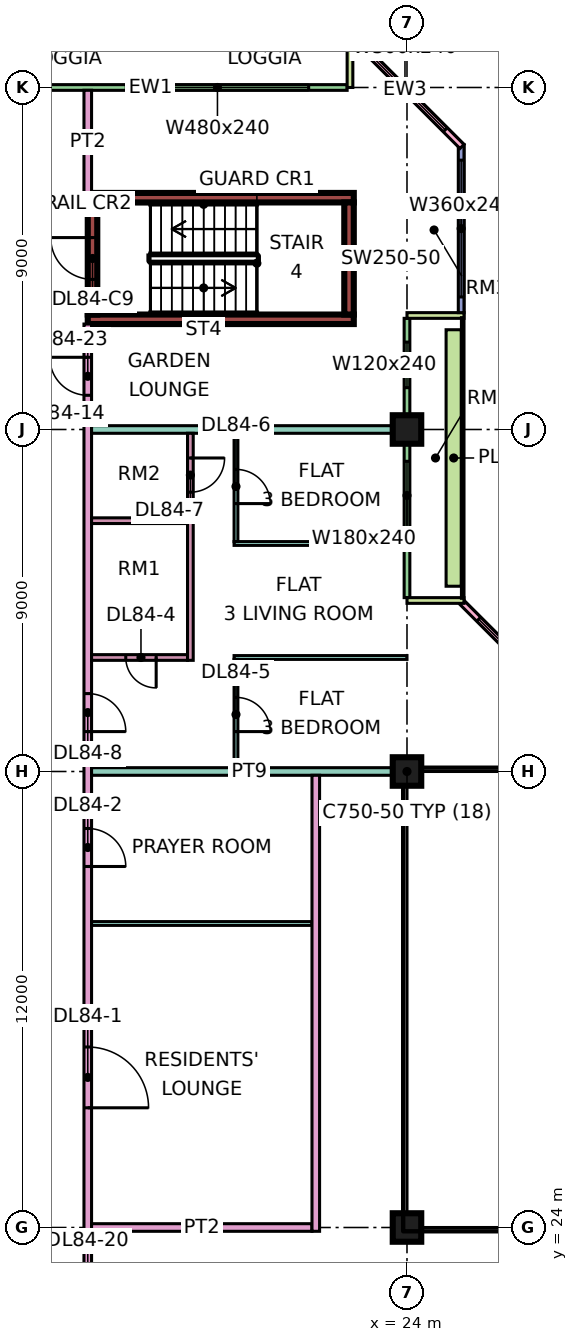
"""IFC4 building model, lengths in metres.
Left out: names, types, materials, properties, quantities, classifications, styles, units other than length and angle.
Written with IfcOpenShell. Run it as: python <this file> out.ifc"""

import sys

from ifc_helpers import new_model, si_unit, direction, frame, frame_2d, origin, origin_2d, place, context, subcontext, project, spatial, rectangle, extrude, element, fill, save


model = new_model("IFC4")
c1 = context("Model", 3, precision=1e-05, world=origin(), true_north=direction((0.0, 1.0)))
c2 = subcontext(c1, "Body", "Model", "MODEL_VIEW")
j1 = project(units=[si_unit("LENGTHUNIT", "METRE"), si_unit("PLANEANGLEUNIT", "RADIAN")], contexts=[c1])
p1 = place(None, origin())
s1 = spatial("IfcSite", under=j1, at=p1, CompositionType="ELEMENT")
p2 = place(p1, origin())
s2 = spatial("IfcBuilding", under=s1, at=p2, CompositionType="ELEMENT")
p3 = place(p2, frame((0.0, 0.0, 361.4)))
s3 = spatial("IfcBuildingStorey", under=s2, at=p3, CompositionType="ELEMENT", Elevation=361.4)
for number, where, z_axis, x_axis in (
    (1, (24.0, 24.0, 0.0), (0.0, 0.0, 1.0), (1.0, 0.0, 0.0)),
    (2, (24.0, 36.0, 0.0), (0.0, 0.0, 1.0), (1.0, 0.0, 0.0)),
    (3, (24.0, 45.0, 0.0), (0.0, 0.0, 1.0), (1.0, 0.0, 0.0)),
):
    element("IfcColumn", number, at=place(p3, frame(where, z_axis=z_axis, x_axis=x_axis)), inside=s3, PredefinedType="COLUMN", context=c2, shape_type="SweptSolid", body=[
        extrude(rectangle(XDim=0.75, YDim=0.75, at=origin_2d()), origin(), (0.0, 0.0, 1.0), 3.75),
    ])
for number, where, z_axis, x_axis in (
    (4, (15.6, 47.9, 0.0), (0.0, 0.0, 1.0), (1.0, 0.0, 0.0)),
    (5, (15.6, 51.1, 0.0), (0.0, 0.0, 1.0), (1.0, 0.0, 0.0)),
):
    element("IfcWall", number, at=place(p3, frame(where, z_axis=z_axis, x_axis=x_axis)), inside=s3, PredefinedType="SHEAR", context=c2, shape_type="SweptSolid", body=[
        extrude(rectangle(XDim=7.0, YDim=0.25, at=frame_2d((3.5, 0.0))), origin(), (0.0, 0.0, 1.0), 3.75),
    ])
p4 = place(p3, frame((15.725, 48.025, 0.0), z_axis=(0.0, 0.0, 1.0), x_axis=(0.0, 1.0, 0.0)))
e6 = element("IfcWall", 6, at=p4, inside=s3, PredefinedType="SHEAR", context=c2, shape_type="SweptSolid", body=[
    extrude(rectangle(XDim=2.95, YDim=0.25, at=frame_2d((1.475, 0.0))), origin(), (0.0, 0.0, 1.0), 3.75),
])
p5 = place(p4, frame((0.925, 0.0, 0.0)))
e7 = element("IfcOpeningElement", 7, at=p5, cuts=e6, PredefinedType="OPENING", context=c2, shape_type="SweptSolid", body=[
    extrude(rectangle(XDim=1.1, YDim=2.2, at=frame_2d((0.55, 1.1))), frame((0.0, 0.135, 0.0), z_axis=(0.0, -1.0, 0.0), x_axis=(1.0, 0.0, 0.0)), (0.0, 0.0, 1.0), 0.27),
])
p6 = place(p3, frame((22.475, 48.025, 0.0), z_axis=(0.0, 0.0, 1.0), x_axis=(0.0, 1.0, 0.0)))
e8 = element("IfcWall", 8, at=p6, inside=s3, PredefinedType="SHEAR", context=c2, shape_type="SweptSolid", body=[
    extrude(rectangle(XDim=2.95, YDim=0.25, at=frame_2d((1.475, 0.0))), origin(), (0.0, 0.0, 1.0), 3.75),
])
p7 = place(p3, frame((28.447, 37.447, 0.0), z_axis=(0.0, 0.0, 1.0), x_axis=(-0.707106781187, 0.707106781187, 0.0)))
e9 = element("IfcWall", 9, at=p7, inside=s3, PredefinedType="SOLIDWALL", context=c2, shape_type="SweptSolid", body=[
    extrude(rectangle(XDim=4.243, YDim=0.15, at=frame_2d((2.121, 0.0))), origin(), (0.0, 0.0, 1.0), 3.35),
])
p8 = place(p7, frame((0.621, 0.0, 0.45)))
e10 = element("IfcOpeningElement", 10, at=p8, cuts=e9, PredefinedType="OPENING", context=c2, shape_type="SweptSolid", body=[
    extrude(rectangle(XDim=3.0, YDim=2.4, at=frame_2d((1.5, 1.2))), frame((0.0, 0.085, 0.0), z_axis=(0.0, -1.0, 0.0), x_axis=(1.0, 0.0, 0.0)), (0.0, 0.0, 1.0), 0.17),
])
p9 = place(p3, frame((24.0, 40.575, 0.0), z_axis=(0.0, 0.0, 1.0), x_axis=(0.0, 1.0, 0.0)))
e11 = element("IfcWall", 11, at=p9, inside=s3, PredefinedType="SOLIDWALL", context=c2, shape_type="SweptSolid", body=[
    extrude(rectangle(XDim=7.35, YDim=0.15, at=frame_2d((3.675, 0.0))), origin(), (0.0, 0.0, 1.0), 3.35),
])
p10 = place(p9, frame((1.788, 0.0, 0.45)))
e12 = element("IfcOpeningElement", 12, at=p10, cuts=e11, PredefinedType="OPENING", context=c2, shape_type="SweptSolid", body=[
    extrude(rectangle(XDim=1.8, YDim=2.4, at=frame_2d((0.9, 1.2))), frame((0.0, 0.085, 0.0), z_axis=(0.0, -1.0, 0.0), x_axis=(1.0, 0.0, 0.0)), (0.0, 0.0, 1.0), 0.17),
])
p11 = place(p9, frame((5.525, 0.0, 0.45)))
e13 = element("IfcOpeningElement", 13, at=p11, cuts=e11, PredefinedType="OPENING", context=c2, shape_type="SweptSolid", body=[
    extrude(rectangle(XDim=1.2, YDim=2.4, at=frame_2d((0.6, 1.2))), frame((0.0, 0.085, 0.0), z_axis=(0.0, -1.0, 0.0), x_axis=(1.0, 0.0, 0.0)), (0.0, 0.0, 1.0), 0.17),
])
for number, where, z_axis, x_axis in (
    (14, (25.5, 40.5, 0.0), (0.0, 0.0, 1.0), (-1.0, 0.0, 0.0)),
    (15, (25.5, 48.0, 0.0), (0.0, 0.0, 1.0), (-1.0, 0.0, 0.0)),
):
    element("IfcWall", number, at=place(p3, frame(where, z_axis=z_axis, x_axis=x_axis)), inside=s3, PredefinedType="SOLIDWALL", context=c2, shape_type="SweptSolid", body=[
        extrude(rectangle(XDim=1.5, YDim=0.15, at=frame_2d((0.75, 0.0))), origin(), (0.0, 0.0, 1.0), 3.35),
    ])
p12 = place(p3, frame((25.425, 48.075, 0.0), z_axis=(0.0, 0.0, 1.0), x_axis=(0.0, 1.0, 0.0)))
e16 = element("IfcWall", 16, at=p12, inside=s3, PredefinedType="SOLIDWALL", context=c2, shape_type="SweptSolid", body=[
    extrude(rectangle(XDim=4.425, YDim=0.15, at=frame_2d((2.212, 0.0))), origin(), (0.0, 0.0, 1.0), 3.35),
])
p13 = place(p12, frame((0.413, 0.0, 0.45)))
e17 = element("IfcOpeningElement", 17, at=p13, cuts=e16, PredefinedType="OPENING", context=c2, shape_type="SweptSolid", body=[
    extrude(rectangle(XDim=3.6, YDim=2.4, at=frame_2d((1.8, 1.2))), frame((0.0, 0.085, 0.0), z_axis=(0.0, -1.0, 0.0), x_axis=(1.0, 0.0, 0.0)), (0.0, 0.0, 1.0), 0.17),
])
p14 = place(p3, frame((25.447, 52.447, 0.0), z_axis=(0.0, 0.0, 1.0), x_axis=(-0.707106781187, 0.707106781187, 0.0)))
e18 = element("IfcWall", 18, at=p14, inside=s3, PredefinedType="SOLIDWALL", context=c2, shape_type="SweptSolid", body=[
    extrude(rectangle(XDim=4.243, YDim=0.15, at=frame_2d((2.121, 0.0))), origin(), (0.0, 0.0, 1.0), 3.35),
])
p15 = place(p14, frame((0.621, 0.0, 0.45)))
e19 = element("IfcOpeningElement", 19, at=p15, cuts=e18, PredefinedType="OPENING", context=c2, shape_type="SweptSolid", body=[
    extrude(rectangle(XDim=3.0, YDim=2.4, at=frame_2d((1.5, 1.2))), frame((0.0, 0.085, 0.0), z_axis=(0.0, -1.0, 0.0), x_axis=(1.0, 0.0, 0.0)), (0.0, 0.0, 1.0), 0.17),
])
p16 = place(p3, frame((22.425, 54.0, 0.0), z_axis=(0.0, 0.0, 1.0), x_axis=(-1.0, 0.0, 0.0)))
e20 = element("IfcWall", 20, at=p16, inside=s3, PredefinedType="SOLIDWALL", context=c2, shape_type="SweptSolid", body=[
    extrude(rectangle(XDim=10.35, YDim=0.15, at=frame_2d((5.175, 0.0))), origin(), (0.0, 0.0, 1.0), 3.35),
])
p17 = place(p16, frame((1.012, 0.0, 0.45)))
e21 = element("IfcOpeningElement", 21, at=p17, cuts=e20, PredefinedType="OPENING", context=c2, shape_type="SweptSolid", body=[
    extrude(rectangle(XDim=4.8, YDim=2.4, at=frame_2d((2.4, 1.2))), frame((0.0, 0.085, 0.0), z_axis=(0.0, -1.0, 0.0), x_axis=(1.0, 0.0, 0.0)), (0.0, 0.0, 1.0), 0.17),
])
p18 = place(p3, frame((22.5, 55.5, 0.0), z_axis=(0.0, 0.0, 1.0), x_axis=(0.0, -1.0, 0.0)))
e22 = element("IfcWall", 22, at=p18, inside=s3, PredefinedType="SOLIDWALL", context=c2, shape_type="SweptSolid", body=[
    extrude(rectangle(XDim=1.5, YDim=0.15, at=frame_2d((0.75, 0.0))), origin(), (0.0, 0.0, 1.0), 3.35),
])
p19 = place(p3, frame((25.229, 40.875, 0.0), z_axis=(0.0, 0.0, 1.0), x_axis=(0.0, 1.0, 0.0)))
e23 = element("IfcWall", 23, at=p19, inside=s3, PredefinedType="SOLIDWALL", context=c2, shape_type="SweptSolid", body=[
    extrude(rectangle(XDim=6.75, YDim=0.4, at=frame_2d((3.375, 0.0))), origin(), (0.0, 0.0, 1.0), 0.7),
])
p20 = place(p3, frame((15.6, 20.0, 0.0), z_axis=(0.0, 0.0, 1.0), x_axis=(0.0, 1.0, 0.0)))
e24 = element("IfcWall", 24, at=p20, inside=s3, PredefinedType="PARTITIONING", context=c2, shape_type="SweptSolid", body=[
    extrude(rectangle(XDim=27.775, YDim=0.2, at=frame_2d((13.887, 0.0))), origin(), (0.0, 0.0, 1.0), 3.35),
])
p21 = place(p20, frame((7.15, 0.0, 0.0)))
e25 = element("IfcOpeningElement", 25, at=p21, cuts=e24, PredefinedType="OPENING", context=c2, shape_type="SweptSolid", body=[
    extrude(rectangle(XDim=1.6, YDim=2.1, at=frame_2d((0.8, 1.05))), frame((0.0, 0.11, 0.0), z_axis=(0.0, -1.0, 0.0), x_axis=(1.0, 0.0, 0.0)), (0.0, 0.0, 1.0), 0.22),
])
p22 = place(p20, frame((13.5, 0.0, 0.0)))
e26 = element("IfcOpeningElement", 26, at=p22, cuts=e24, PredefinedType="OPENING", context=c2, shape_type="SweptSolid", body=[
    extrude(rectangle(XDim=1.0, YDim=2.1, at=frame_2d((0.5, 1.05))), frame((0.0, 0.11, 0.0), z_axis=(0.0, -1.0, 0.0), x_axis=(1.0, 0.0, 0.0)), (0.0, 0.0, 1.0), 0.22),
])
p23 = place(p20, frame((17.05, 0.0, 0.0)))
e27 = element("IfcOpeningElement", 27, at=p23, cuts=e24, PredefinedType="OPENING", context=c2, shape_type="SweptSolid", body=[
    extrude(rectangle(XDim=1.0, YDim=2.1, at=frame_2d((0.5, 1.05))), frame((0.0, 0.11, 0.0), z_axis=(0.0, -1.0, 0.0), x_axis=(1.0, 0.0, 0.0)), (0.0, 0.0, 1.0), 0.22),
])
p24 = place(p20, frame((1.15, 0.0, 0.0)))
e28 = element("IfcOpeningElement", 28, at=p24, cuts=e24, PredefinedType="OPENING", context=c2, shape_type="SweptSolid", body=[
    extrude(rectangle(XDim=1.8, YDim=2.1, at=frame_2d((0.9, 1.05))), frame((0.0, 0.11, 0.0), z_axis=(0.0, -1.0, 0.0), x_axis=(1.0, 0.0, 0.0)), (0.0, 0.0, 1.0), 0.22),
])
p25 = place(p20, frame((25.9, 0.0, 0.0)))
e29 = element("IfcOpeningElement", 29, at=p25, cuts=e24, PredefinedType="OPENING", context=c2, shape_type="SweptSolid", body=[
    extrude(rectangle(XDim=1.0, YDim=2.1, at=frame_2d((0.5, 1.05))), frame((0.0, 0.11, 0.0), z_axis=(0.0, -1.0, 0.0), x_axis=(1.0, 0.0, 0.0)), (0.0, 0.0, 1.0), 0.22),
])
p26 = place(p3, frame((15.6, 51.225, 0.0), z_axis=(0.0, 0.0, 1.0), x_axis=(0.0, 1.0, 0.0)))
e30 = element("IfcWall", 30, at=p26, inside=s3, PredefinedType="PARTITIONING", context=c2, shape_type="SweptSolid", body=[
    extrude(rectangle(XDim=2.701, YDim=0.2, at=frame_2d((1.351, 0.0))), origin(), (0.0, 0.0, 1.0), 3.35),
])
p27 = place(p3, frame((15.7, 24.0, 0.0), z_axis=(0.0, 0.0, 1.0), x_axis=(1.0, 0.0, 0.0)))
e31 = element("IfcWall", 31, at=p27, inside=s3, PredefinedType="PARTITIONING", context=c2, shape_type="SweptSolid", body=[
    extrude(rectangle(XDim=5.8, YDim=0.2, at=frame_2d((2.9, 0.0))), origin(), (0.0, 0.0, 1.0), 3.35),
])
p28 = place(p3, frame((15.7, 32.0, 0.0), z_axis=(0.0, 0.0, 1.0), x_axis=(1.0, 0.0, 0.0)))
e32 = element("IfcWall", 32, at=p28, inside=s3, PredefinedType="PARTITIONING", context=c2, shape_type="SweptSolid", body=[
    extrude(rectangle(XDim=5.8, YDim=0.1, at=frame_2d((2.9, 0.0))), origin(), (0.0, 0.0, 1.0), 3.35),
])
p29 = place(p3, frame((15.7, 36.0, 0.0), z_axis=(0.0, 0.0, 1.0), x_axis=(1.0, 0.0, 0.0)))
e33 = element("IfcWall", 33, at=p29, inside=s3, PredefinedType="PARTITIONING", context=c2, shape_type="SweptSolid", body=[
    extrude(rectangle(XDim=8.3, YDim=0.2, at=frame_2d((4.15, 0.0))), origin(), (0.0, 0.0, 1.0), 3.35),
])
p30 = place(p3, frame((15.7, 39.0, 0.0), z_axis=(0.0, 0.0, 1.0), x_axis=(1.0, 0.0, 0.0)))
e34 = element("IfcWall", 34, at=p30, inside=s3, PredefinedType="PARTITIONING", context=c2, shape_type="SweptSolid", body=[
    extrude(rectangle(XDim=2.525, YDim=0.15, at=frame_2d((1.263, 0.0))), origin(), (0.0, 0.0, 1.0), 3.35),
])
p31 = place(p30, frame((0.9, 0.0, 0.0)))
e35 = element("IfcOpeningElement", 35, at=p31, cuts=e34, PredefinedType="OPENING", context=c2, shape_type="SweptSolid", body=[
    extrude(rectangle(XDim=0.8, YDim=2.1, at=frame_2d((0.4, 1.05))), frame((0.0, 0.085, 0.0), z_axis=(0.0, -1.0, 0.0), x_axis=(1.0, 0.0, 0.0)), (0.0, 0.0, 1.0), 0.17),
])
p32 = place(p3, frame((15.7, 42.6, 0.0), z_axis=(0.0, 0.0, 1.0), x_axis=(1.0, 0.0, 0.0)))
e36 = element("IfcWall", 36, at=p32, inside=s3, PredefinedType="PARTITIONING", context=c2, shape_type="SweptSolid", body=[
    extrude(rectangle(XDim=2.525, YDim=0.15, at=frame_2d((1.263, 0.0))), origin(), (0.0, 0.0, 1.0), 3.35),
])
p33 = place(p3, frame((15.7, 45.0, 0.0), z_axis=(0.0, 0.0, 1.0), x_axis=(1.0, 0.0, 0.0)))
e37 = element("IfcWall", 37, at=p33, inside=s3, PredefinedType="PARTITIONING", context=c2, shape_type="SweptSolid", body=[
    extrude(rectangle(XDim=8.226, YDim=0.2, at=frame_2d((4.113, 0.0))), origin(), (0.0, 0.0, 1.0), 3.35),
])
p34 = place(p3, frame((18.3, 38.925, 0.0), z_axis=(0.0, 0.0, 1.0), x_axis=(0.0, 1.0, 0.0)))
e38 = element("IfcWall", 38, at=p34, inside=s3, PredefinedType="PARTITIONING", context=c2, shape_type="SweptSolid", body=[
    extrude(rectangle(XDim=5.975, YDim=0.15, at=frame_2d((2.987, 0.0))), origin(), (0.0, 0.0, 1.0), 3.35),
])
p35 = place(p34, frame((4.425, 0.0, 0.0)))
e39 = element("IfcOpeningElement", 39, at=p35, cuts=e38, PredefinedType="OPENING", context=c2, shape_type="SweptSolid", body=[
    extrude(rectangle(XDim=0.9, YDim=2.1, at=frame_2d((0.45, 1.05))), frame((0.0, 0.085, 0.0), z_axis=(0.0, -1.0, 0.0), x_axis=(1.0, 0.0, 0.0)), (0.0, 0.0, 1.0), 0.17),
])
p36 = place(p3, frame((19.45, 39.0, 0.0), z_axis=(0.0, 0.0, 1.0), x_axis=(1.0, 0.0, 0.0)))
e40 = element("IfcWall", 40, at=p36, inside=s3, PredefinedType="PARTITIONING", context=c2, shape_type="SweptSolid", body=[
    extrude(rectangle(XDim=4.55, YDim=0.1, at=frame_2d((2.275, 0.0))), origin(), (0.0, 0.0, 1.0), 3.35),
])
p37 = place(p3, frame((19.45, 42.0, 0.0), z_axis=(0.0, 0.0, 1.0), x_axis=(1.0, 0.0, 0.0)))
e41 = element("IfcWall", 41, at=p37, inside=s3, PredefinedType="PARTITIONING", context=c2, shape_type="SweptSolid", body=[
    extrude(rectangle(XDim=4.476, YDim=0.1, at=frame_2d((2.238, 0.0))), origin(), (0.0, 0.0, 1.0), 3.35),
])
p38 = place(p3, frame((19.5, 36.1, 0.0), z_axis=(0.0, 0.0, 1.0), x_axis=(0.0, 1.0, 0.0)))
e42 = element("IfcWall", 42, at=p38, inside=s3, PredefinedType="PARTITIONING", context=c2, shape_type="SweptSolid", body=[
    extrude(rectangle(XDim=2.85, YDim=0.1, at=frame_2d((1.425, 0.0))), origin(), (0.0, 0.0, 1.0), 3.35),
])
p39 = place(p38, frame((0.95, 0.0, 0.0)))
e43 = element("IfcOpeningElement", 43, at=p39, cuts=e42, PredefinedType="OPENING", context=c2, shape_type="SweptSolid", body=[
    extrude(rectangle(XDim=0.9, YDim=2.1, at=frame_2d((0.45, 1.05))), frame((0.0, 0.06, 0.0), z_axis=(0.0, -1.0, 0.0), x_axis=(1.0, 0.0, 0.0)), (0.0, 0.0, 1.0), 0.12),
])
p40 = place(p3, frame((19.5, 42.05, 0.0), z_axis=(0.0, 0.0, 1.0), x_axis=(0.0, 1.0, 0.0)))
e44 = element("IfcWall", 44, at=p40, inside=s3, PredefinedType="PARTITIONING", context=c2, shape_type="SweptSolid", body=[
    extrude(rectangle(XDim=2.85, YDim=0.1, at=frame_2d((1.425, 0.0))), origin(), (0.0, 0.0, 1.0), 3.35),
])
p41 = place(p40, frame((1.0, 0.0, 0.0)))
e45 = element("IfcOpeningElement", 45, at=p41, cuts=e44, PredefinedType="OPENING", context=c2, shape_type="SweptSolid", body=[
    extrude(rectangle(XDim=0.9, YDim=2.1, at=frame_2d((0.45, 1.05))), frame((0.0, 0.06, 0.0), z_axis=(0.0, -1.0, 0.0), x_axis=(1.0, 0.0, 0.0)), (0.0, 0.0, 1.0), 0.12),
])
p42 = place(p3, frame((21.6, 23.9, 0.0), z_axis=(0.0, 0.0, 1.0), x_axis=(0.0, 1.0, 0.0)))
e46 = element("IfcWall", 46, at=p42, inside=s3, PredefinedType="PARTITIONING", context=c2, shape_type="SweptSolid", body=[
    extrude(rectangle(XDim=12.0, YDim=0.2, at=frame_2d((6.0, 0.0))), origin(), (0.0, 0.0, 1.0), 3.35),
])
p43 = place(p8, origin())
e47 = element("IfcWindow", 47, at=p43, inside=s3, PartitioningType="SINGLE_PANEL", PredefinedType="WINDOW", context=c2, shape_type="SweptSolid", body=[
    extrude(rectangle(XDim=3.0, YDim=2.4, at=frame_2d((1.5, 1.2))), frame((0.0, 0.03, 0.0), z_axis=(0.0, -1.0, 0.0), x_axis=(1.0, 0.0, 0.0)), (0.0, 0.0, 1.0), 0.06),
])
fill(e10, e47)
p44 = place(p10, origin())
e48 = element("IfcWindow", 48, at=p44, inside=s3, PartitioningType="SINGLE_PANEL", PredefinedType="WINDOW", context=c2, shape_type="SweptSolid", body=[
    extrude(rectangle(XDim=1.8, YDim=2.4, at=frame_2d((0.9, 1.2))), frame((0.0, 0.03, 0.0), z_axis=(0.0, -1.0, 0.0), x_axis=(1.0, 0.0, 0.0)), (0.0, 0.0, 1.0), 0.06),
])
fill(e12, e48)
p45 = place(p11, origin())
e49 = element("IfcWindow", 49, at=p45, inside=s3, PartitioningType="SINGLE_PANEL", PredefinedType="WINDOW", context=c2, shape_type="SweptSolid", body=[
    extrude(rectangle(XDim=1.2, YDim=2.4, at=frame_2d((0.6, 1.2))), frame((0.0, 0.03, 0.0), z_axis=(0.0, -1.0, 0.0), x_axis=(1.0, 0.0, 0.0)), (0.0, 0.0, 1.0), 0.06),
])
fill(e13, e49)
p46 = place(p13, origin())
e50 = element("IfcWindow", 50, at=p46, inside=s3, PartitioningType="SINGLE_PANEL", PredefinedType="WINDOW", context=c2, shape_type="SweptSolid", body=[
    extrude(rectangle(XDim=3.6, YDim=2.4, at=frame_2d((1.8, 1.2))), frame((0.0, 0.03, 0.0), z_axis=(0.0, -1.0, 0.0), x_axis=(1.0, 0.0, 0.0)), (0.0, 0.0, 1.0), 0.06),
])
fill(e17, e50)
p47 = place(p15, origin())
e51 = element("IfcWindow", 51, at=p47, inside=s3, PartitioningType="SINGLE_PANEL", PredefinedType="WINDOW", context=c2, shape_type="SweptSolid", body=[
    extrude(rectangle(XDim=3.0, YDim=2.4, at=frame_2d((1.5, 1.2))), frame((0.0, 0.03, 0.0), z_axis=(0.0, -1.0, 0.0), x_axis=(1.0, 0.0, 0.0)), (0.0, 0.0, 1.0), 0.06),
])
fill(e19, e51)
p48 = place(p17, origin())
e52 = element("IfcWindow", 52, at=p48, inside=s3, PartitioningType="SINGLE_PANEL", PredefinedType="WINDOW", context=c2, shape_type="SweptSolid", body=[
    extrude(rectangle(XDim=4.8, YDim=2.4, at=frame_2d((2.4, 1.2))), frame((0.0, 0.03, 0.0), z_axis=(0.0, -1.0, 0.0), x_axis=(1.0, 0.0, 0.0)), (0.0, 0.0, 1.0), 0.06),
])
fill(e21, e52)
p49 = place(p5, frame((1.1, 0.0, 0.0), z_axis=(0.0, 0.0, 1.0), x_axis=(-1.0, 0.0, 0.0)))
e53 = element("IfcDoor", 53, at=p49, inside=s3, OperationType="SINGLE_SWING_RIGHT", PredefinedType="DOOR", context=c2, shape_type="SweptSolid", body=[
    extrude(rectangle(XDim=1.1, YDim=2.2, at=frame_2d((0.55, 1.1))), frame((0.0, 0.025, 0.0), z_axis=(0.0, -1.0, 0.0), x_axis=(1.0, 0.0, 0.0)), (0.0, 0.0, 1.0), 0.05),
])
fill(e7, e53)
p50 = place(p21, frame((1.6, 0.0, 0.0), z_axis=(0.0, 0.0, 1.0), x_axis=(-1.0, 0.0, 0.0)))
e54 = element("IfcDoor", 54, at=p50, inside=s3, OperationType="DOUBLE_DOOR_SINGLE_SWING", PredefinedType="DOOR", context=c2, shape_type="SweptSolid", body=[
    extrude(rectangle(XDim=1.6, YDim=2.1, at=frame_2d((0.8, 1.05))), frame((0.0, 0.025, 0.0), z_axis=(0.0, -1.0, 0.0), x_axis=(1.0, 0.0, 0.0)), (0.0, 0.0, 1.0), 0.05),
])
fill(e25, e54)
p51 = place(p22, frame((1.0, 0.0, 0.0), z_axis=(0.0, 0.0, 1.0), x_axis=(-1.0, 0.0, 0.0)))
e55 = element("IfcDoor", 55, at=p51, inside=s3, OperationType="SINGLE_SWING_LEFT", PredefinedType="DOOR", context=c2, shape_type="SweptSolid", body=[
    extrude(rectangle(XDim=1.0, YDim=2.1, at=frame_2d((0.5, 1.05))), frame((0.0, 0.025, 0.0), z_axis=(0.0, -1.0, 0.0), x_axis=(1.0, 0.0, 0.0)), (0.0, 0.0, 1.0), 0.05),
])
fill(e26, e55)
p52 = place(p31, origin())
e56 = element("IfcDoor", 56, at=p52, inside=s3, OperationType="SINGLE_SWING_RIGHT", PredefinedType="DOOR", context=c2, shape_type="SweptSolid", body=[
    extrude(rectangle(XDim=0.8, YDim=2.1, at=frame_2d((0.4, 1.05))), frame((0.0, 0.025, 0.0), z_axis=(0.0, -1.0, 0.0), x_axis=(1.0, 0.0, 0.0)), (0.0, 0.0, 1.0), 0.05),
])
fill(e35, e56)
p53 = place(p39, frame((0.9, 0.0, 0.0), z_axis=(0.0, 0.0, 1.0), x_axis=(-1.0, 0.0, 0.0)))
e57 = element("IfcDoor", 57, at=p53, inside=s3, OperationType="SINGLE_SWING_LEFT", PredefinedType="DOOR", context=c2, shape_type="SweptSolid", body=[
    extrude(rectangle(XDim=0.9, YDim=2.1, at=frame_2d((0.45, 1.05))), frame((0.0, 0.025, 0.0), z_axis=(0.0, -1.0, 0.0), x_axis=(1.0, 0.0, 0.0)), (0.0, 0.0, 1.0), 0.05),
])
fill(e43, e57)
p54 = place(p41, frame((0.9, 0.0, 0.0), z_axis=(0.0, 0.0, 1.0), x_axis=(-1.0, 0.0, 0.0)))
e58 = element("IfcDoor", 58, at=p54, inside=s3, OperationType="SINGLE_SWING_LEFT", PredefinedType="DOOR", context=c2, shape_type="SweptSolid", body=[
    extrude(rectangle(XDim=0.9, YDim=2.1, at=frame_2d((0.45, 1.05))), frame((0.0, 0.025, 0.0), z_axis=(0.0, -1.0, 0.0), x_axis=(1.0, 0.0, 0.0)), (0.0, 0.0, 1.0), 0.05),
])
fill(e45, e58)
p55 = place(p35, origin())
e59 = element("IfcDoor", 59, at=p55, inside=s3, OperationType="SINGLE_SWING_RIGHT", PredefinedType="DOOR", context=c2, shape_type="SweptSolid", body=[
    extrude(rectangle(XDim=0.9, YDim=2.1, at=frame_2d((0.45, 1.05))), frame((0.0, 0.025, 0.0), z_axis=(0.0, -1.0, 0.0), x_axis=(1.0, 0.0, 0.0)), (0.0, 0.0, 1.0), 0.05),
])
fill(e39, e59)
p56 = place(p23, frame((1.0, 0.0, 0.0), z_axis=(0.0, 0.0, 1.0), x_axis=(-1.0, 0.0, 0.0)))
e60 = element("IfcDoor", 60, at=p56, inside=s3, OperationType="SINGLE_SWING_LEFT", PredefinedType="DOOR", context=c2, shape_type="SweptSolid", body=[
    extrude(rectangle(XDim=1.0, YDim=2.1, at=frame_2d((0.5, 1.05))), frame((0.0, 0.025, 0.0), z_axis=(0.0, -1.0, 0.0), x_axis=(1.0, 0.0, 0.0)), (0.0, 0.0, 1.0), 0.05),
])
fill(e27, e60)
p57 = place(p25, frame((1.0, 0.0, 0.0), z_axis=(0.0, 0.0, 1.0), x_axis=(-1.0, 0.0, 0.0)))
e61 = element("IfcDoor", 61, at=p57, inside=s3, OperationType="SINGLE_SWING_RIGHT", PredefinedType="DOOR", context=c2, shape_type="SweptSolid", body=[
    extrude(rectangle(XDim=1.0, YDim=2.1, at=frame_2d((0.5, 1.05))), frame((0.0, 0.025, 0.0), z_axis=(0.0, -1.0, 0.0), x_axis=(1.0, 0.0, 0.0)), (0.0, 0.0, 1.0), 0.05),
])
fill(e29, e61)
save(model, sys.argv[1])
